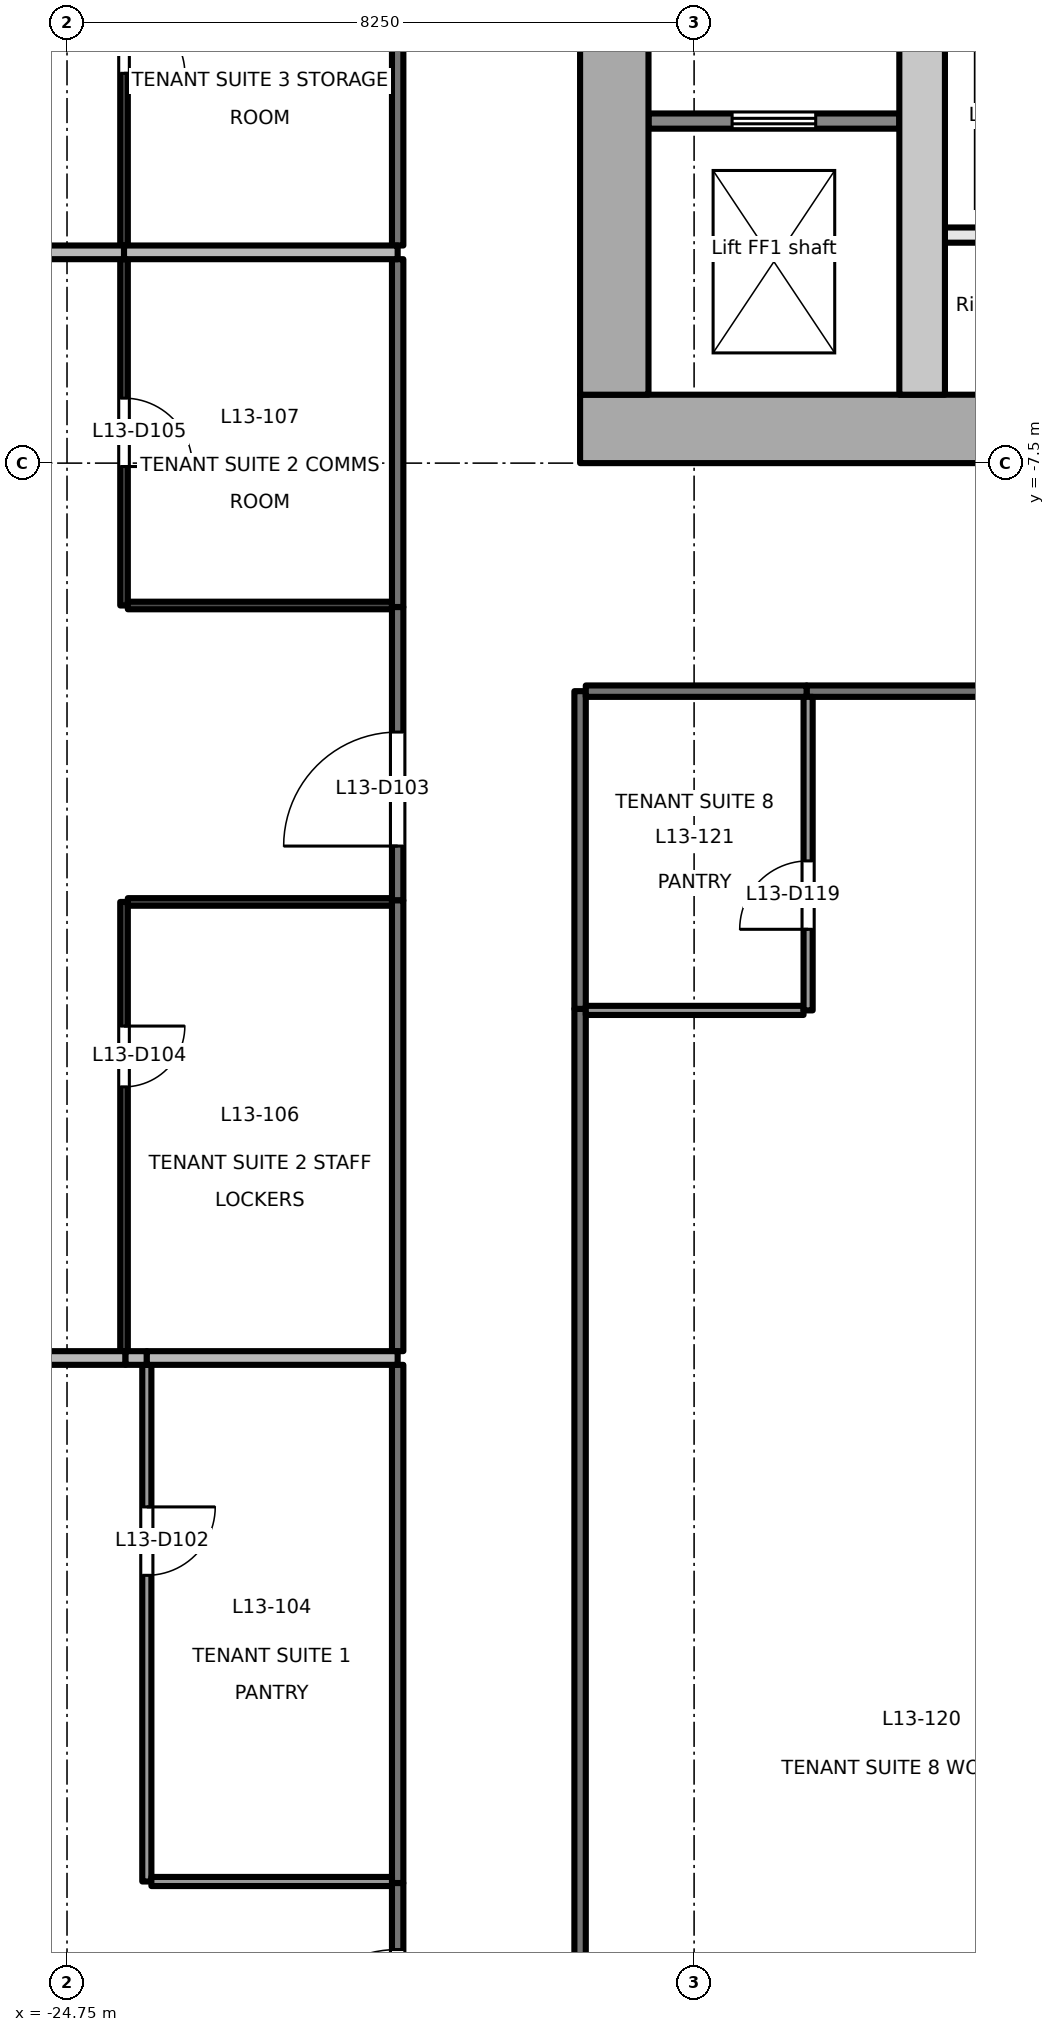
"""IFC4 building model, lengths in metres.
Left out: names, types, materials, properties, quantities, classifications, styles, units other than length and angle.
Written with IfcOpenShell. Run it as: python <this file> out.ifc"""

import sys

from ifc_helpers import new_model, si_unit, direction, frame, frame_2d, origin, place, context, subcontext, project, spatial, rectangle, extrude, element, fill, save


model = new_model("IFC4")
c1 = context("Model", 3, precision=1e-05, world=origin(), true_north=direction((0.0, 1.0)))
c2 = subcontext(c1, "Body", "Model", "MODEL_VIEW")
j1 = project(units=[si_unit("LENGTHUNIT", "METRE"), si_unit("PLANEANGLEUNIT", "RADIAN")], contexts=[c1])
p1 = place(None, origin())
s1 = spatial("IfcSite", under=j1, at=p1, CompositionType="ELEMENT")
p2 = place(p1, origin())
s2 = spatial("IfcBuilding", under=s1, at=p2, CompositionType="ELEMENT")
p3 = place(p2, frame((0.0, 0.0, 61.1)))
s3 = spatial("IfcBuildingStorey", under=s2, at=p3, CompositionType="ELEMENT", Elevation=61.1)
p4 = place(p3, frame((-18.0, -7.05, -0.2), z_axis=(0.0, 0.0, 1.0), x_axis=(1.0, 0.0, 0.0)))
e1 = element("IfcWall", 1, at=p4, inside=s3, PredefinedType="SHEAR", context=c2, shape_type="SweptSolid", body=[
    extrude(rectangle(XDim=36.0, YDim=0.9, at=frame_2d((18.0, 0.0))), origin(), (0.0, 0.0, 1.0), 4.1),
])
p5 = place(p4, frame((7.8, 0.0, 0.2)))
e2 = element("IfcOpeningElement", 2, at=p5, cuts=e1, PredefinedType="OPENING", context=c2, shape_type="SweptSolid", body=[
    extrude(rectangle(XDim=2.4, YDim=2.1, at=frame_2d((1.2, 1.05))), frame((0.0, 0.46, 0.0), z_axis=(0.0, -1.0, 0.0), x_axis=(1.0, 0.0, 0.0)), (0.0, 0.0, 1.0), 0.921),
])
p6 = place(p4, frame((17.4, 0.0, 0.2)))
e3 = element("IfcOpeningElement", 3, at=p6, cuts=e1, PredefinedType="OPENING", context=c2, shape_type="SweptSolid", body=[
    extrude(rectangle(XDim=1.2, YDim=2.1, at=frame_2d((0.6, 1.05))), frame((0.0, 0.46, 0.0), z_axis=(0.0, -1.0, 0.0), x_axis=(1.0, 0.0, 0.0)), (0.0, 0.0, 1.0), 0.921),
])
p7 = place(p4, frame((26.1, 0.0, 0.2)))
e4 = element("IfcOpeningElement", 4, at=p7, cuts=e1, PredefinedType="OPENING", context=c2, shape_type="SweptSolid", body=[
    extrude(rectangle(XDim=2.4, YDim=2.1, at=frame_2d((1.2, 1.05))), frame((0.0, 0.46, 0.0), z_axis=(0.0, -1.0, 0.0), x_axis=(1.0, 0.0, 0.0)), (0.0, 0.0, 1.0), 0.921),
])
p8 = place(p3, frame((-17.55, -6.6, -0.2), z_axis=(0.0, 0.0, 1.0), x_axis=(0.0, 1.0, 0.0)))
e5 = element("IfcWall", 5, at=p8, inside=s3, PredefinedType="SHEAR", context=c2, shape_type="SweptSolid", body=[
    extrude(rectangle(XDim=13.2, YDim=0.9, at=frame_2d((6.6, 0.0))), origin(), (0.0, 0.0, 1.0), 4.1),
])
p9 = place(p8, frame((4.55, 0.0, 0.2)))
e6 = element("IfcOpeningElement", 6, at=p9, cuts=e5, PredefinedType="OPENING", context=c2, shape_type="SweptSolid", body=[
    extrude(rectangle(XDim=1.2, YDim=2.1, at=frame_2d((0.6, 1.05))), frame((0.0, 0.46, 0.0), z_axis=(0.0, -1.0, 0.0), x_axis=(1.0, 0.0, 0.0)), (0.0, 0.0, 1.0), 0.921),
])
p10 = place(p3, frame((-13.5, -6.6, -0.2), z_axis=(0.0, 0.0, 1.0), x_axis=(0.0, 1.0, 0.0)))
e7 = element("IfcWall", 7, at=p10, inside=s3, PredefinedType="SHEAR", context=c2, shape_type="SweptSolid", body=[
    extrude(rectangle(XDim=13.2, YDim=0.6, at=frame_2d((6.6, 0.0))), origin(), (0.0, 0.0, 1.0), 4.1),
])
p11 = place(p3, frame((-17.1, -3.0, 0.0), z_axis=(0.0, 0.0, 1.0), x_axis=(1.0, 0.0, 0.0)))
e8 = element("IfcWall", 8, at=p11, inside=s3, PredefinedType="PARTITIONING", context=c2, shape_type="SweptSolid", body=[
    extrude(rectangle(XDim=3.3, YDim=0.2, at=frame_2d((1.65, 0.0))), origin(), (0.0, 0.0, 1.0), 3.9),
])
p12 = place(p11, frame((1.1, 0.0, 0.0)))
e9 = element("IfcOpeningElement", 9, at=p12, cuts=e8, PredefinedType="OPENING", context=c2, shape_type="SweptSolid", body=[
    extrude(rectangle(XDim=1.1, YDim=2.1, at=frame_2d((0.55, 1.05))), frame((0.0, 0.111, 0.0), z_axis=(0.0, -1.0, 0.0), x_axis=(1.0, 0.0, 0.0)), (0.0, 0.0, 1.0), 0.221),
])
p13 = place(p3, frame((-13.2, -4.5, 0.0), z_axis=(0.0, 0.0, 1.0), x_axis=(1.0, 0.0, 0.0)))
e10 = element("IfcWall", 10, at=p13, inside=s3, PredefinedType="PARTITIONING", context=c2, shape_type="SweptSolid", body=[
    extrude(rectangle(XDim=2.3, YDim=0.2, at=frame_2d((1.15, 0.0))), origin(), (0.0, 0.0, 1.0), 3.9),
])
p14 = place(p3, frame((-20.4, -30.68, 0.0), z_axis=(0.0, 0.0, 1.0), x_axis=(0.0, 1.0, 0.0)))
e11 = element("IfcWall", 11, at=p14, inside=s3, PredefinedType="PARTITIONING", context=c2, shape_type="SweptSolid", body=[
    extrude(rectangle(XDim=4.5, YDim=0.15, at=frame_2d((2.25, 0.0))), origin(), (0.0, 0.0, 1.0), 3.3),
])
p15 = place(p14, frame((2.125, 0.0, 0.0)))
e12 = element("IfcOpeningElement", 12, at=p15, cuts=e11, PredefinedType="OPENING", context=c2, shape_type="SweptSolid", body=[
    extrude(rectangle(XDim=1.5, YDim=2.1, at=frame_2d((0.75, 1.05))), frame((0.0, 0.085, 0.0), z_axis=(0.0, -1.0, 0.0), x_axis=(1.0, 0.0, 0.0)), (0.0, 0.0, 1.0), 0.171),
])
p16 = place(p3, frame((-20.4, -26.18, 0.0), z_axis=(0.0, 0.0, 1.0), x_axis=(0.0, 1.0, 0.0)))
e13 = element("IfcWall", 13, at=p16, inside=s3, PredefinedType="PARTITIONING", context=c2, shape_type="SweptSolid", body=[
    extrude(rectangle(XDim=6.817, YDim=0.15, at=frame_2d((3.408, 0.0))), origin(), (0.0, 0.0, 1.0), 3.3),
])
p17 = place(p3, frame((-20.4, -13.253, 0.0), z_axis=(0.0, 0.0, 1.0), x_axis=(0.0, 1.0, 0.0)))
e14 = element("IfcWall", 14, at=p17, inside=s3, PredefinedType="PARTITIONING", context=c2, shape_type="SweptSolid", body=[
    extrude(rectangle(XDim=3.86, YDim=0.15, at=frame_2d((1.93, 0.0))), origin(), (0.0, 0.0, 1.0), 3.9),
])
p18 = place(p17, frame((0.715, 0.0, 0.0)))
e15 = element("IfcOpeningElement", 15, at=p18, cuts=e14, PredefinedType="OPENING", context=c2, shape_type="SweptSolid", body=[
    extrude(rectangle(XDim=1.5, YDim=2.1, at=frame_2d((0.75, 1.05))), frame((0.0, 0.085, 0.0), z_axis=(0.0, -1.0, 0.0), x_axis=(1.0, 0.0, 0.0)), (0.0, 0.0, 1.0), 0.171),
])
p19 = place(p3, frame((-20.4, -19.183, 0.0), z_axis=(0.0, 0.0, 1.0), x_axis=(0.0, 1.0, 0.0)))
e16 = element("IfcWall", 16, at=p19, inside=s3, PredefinedType="PARTITIONING", context=c2, shape_type="SweptSolid", body=[
    extrude(rectangle(XDim=5.93, YDim=0.15, at=frame_2d((2.965, 0.0))), origin(), (0.0, 0.0, 1.0), 3.3),
])
p20 = place(p3, frame((-20.4, -9.393, 0.0), z_axis=(0.0, 0.0, 1.0), x_axis=(0.0, 1.0, 0.0)))
e17 = element("IfcWall", 17, at=p20, inside=s3, PredefinedType="PARTITIONING", context=c2, shape_type="SweptSolid", body=[
    extrude(rectangle(XDim=4.576, YDim=0.15, at=frame_2d((2.288, 0.0))), origin(), (0.0, 0.0, 1.0), 3.3),
])
p21 = place(p3, frame((-20.4, -4.637, 0.0), z_axis=(0.0, 0.0, 1.0), x_axis=(0.0, 1.0, 0.0)))
e18 = element("IfcWall", 18, at=p21, inside=s3, PredefinedType="PARTITIONING", context=c2, shape_type="SweptSolid", body=[
    extrude(rectangle(XDim=5.33, YDim=0.15, at=frame_2d((2.665, 0.0))), origin(), (0.0, 0.0, 1.0), 3.3),
])
p22 = place(p3, frame((-18.0, -14.68, 0.0), z_axis=(0.0, 0.0, 1.0), x_axis=(0.0, -1.0, 0.0)))
e19 = element("IfcWall", 19, at=p22, inside=s3, PredefinedType="PARTITIONING", context=c2, shape_type="SweptSolid", body=[
    extrude(rectangle(XDim=19.06, YDim=0.15, at=frame_2d((9.53, 0.0))), origin(), (0.0, 0.0, 1.0), 2.5),
])
p23 = place(p22, frame((13.045, 0.0, 0.0)))
e20 = element("IfcOpeningElement", 20, at=p23, cuts=e19, PredefinedType="OPENING", context=c2, shape_type="SweptSolid", body=[
    extrude(rectangle(XDim=1.5, YDim=2.1, at=frame_2d((0.75, 1.05))), frame((0.0, 0.085, 0.0), z_axis=(0.0, -1.0, 0.0), x_axis=(1.0, 0.0, 0.0)), (0.0, 0.0, 1.0), 0.171),
])
p24 = place(p3, frame((-9.09, -10.5, 0.0), z_axis=(0.0, 0.0, 1.0), x_axis=(-1.0, 0.0, 0.0)))
e21 = element("IfcWall", 21, at=p24, inside=s3, PredefinedType="PARTITIONING", context=c2, shape_type="SweptSolid", body=[
    extrude(rectangle(XDim=5.93, YDim=0.15, at=frame_2d((2.965, 0.0))), origin(), (0.0, 0.0, 1.0), 2.9),
])
p25 = place(p3, frame((-18.0, -10.5, 0.0), z_axis=(0.0, 0.0, 1.0), x_axis=(0.0, -1.0, 0.0)))
e22 = element("IfcWall", 22, at=p25, inside=s3, PredefinedType="PARTITIONING", context=c2, shape_type="SweptSolid", body=[
    extrude(rectangle(XDim=4.18, YDim=0.15, at=frame_2d((2.09, 0.0))), origin(), (0.0, 0.0, 1.0), 2.5),
])
p26 = place(p3, frame((-15.02, -10.5, 0.0), z_axis=(0.0, 0.0, 1.0), x_axis=(-1.0, 0.0, 0.0)))
e23 = element("IfcWall", 23, at=p26, inside=s3, PredefinedType="PARTITIONING", context=c2, shape_type="SweptSolid", body=[
    extrude(rectangle(XDim=2.905, YDim=0.15, at=frame_2d((1.453, 0.0))), origin(), (0.0, 0.0, 1.0), 2.5),
])
p27 = place(p3, frame((-23.7, -19.363, 0.0), z_axis=(0.0, 0.0, 1.0), x_axis=(0.0, -1.0, 0.0)))
e24 = element("IfcWall", 24, at=p27, inside=s3, PredefinedType="PARTITIONING", context=c2, shape_type="SweptSolid", body=[
    extrude(rectangle(XDim=6.797, YDim=0.12, at=frame_2d((3.398, 0.0))), origin(), (0.0, 0.0, 1.0), 3.3),
])
p28 = place(p27, frame((1.869, 0.0, 0.0)))
e25 = element("IfcOpeningElement", 25, at=p28, cuts=e24, PredefinedType="OPENING", context=c2, shape_type="SweptSolid", body=[
    extrude(rectangle(XDim=0.9, YDim=2.1, at=frame_2d((0.45, 1.05))), frame((0.0, 0.071, 0.0), z_axis=(0.0, -1.0, 0.0), x_axis=(1.0, 0.0, 0.0)), (0.0, 0.0, 1.0), 0.141),
])
p29 = place(p3, frame((-23.64, -26.16, 0.0), z_axis=(0.0, 0.0, 1.0), x_axis=(1.0, 0.0, 0.0)))
e26 = element("IfcWall", 26, at=p29, inside=s3, PredefinedType="PARTITIONING", context=c2, shape_type="SweptSolid", body=[
    extrude(rectangle(XDim=3.165, YDim=0.12, at=frame_2d((1.583, 0.0))), origin(), (0.0, 0.0, 1.0), 3.9),
])
p30 = place(p3, frame((-32.74, -19.273, 0.0), z_axis=(0.0, 0.0, 1.0), x_axis=(1.0, 0.0, 0.0)))
e27 = element("IfcWall", 27, at=p30, inside=s3, PredefinedType="PARTITIONING", context=c2, shape_type="SweptSolid", body=[
    extrude(rectangle(XDim=8.76, YDim=0.18, at=frame_2d((4.38, 0.0))), origin(), (0.0, 0.0, 1.0), 3.9),
])
p31 = place(p3, frame((-23.98, -19.273, 0.0), z_axis=(0.0, 0.0, 1.0), x_axis=(1.0, 0.0, 0.0)))
e28 = element("IfcWall", 28, at=p31, inside=s3, PredefinedType="PARTITIONING", context=c2, shape_type="SweptSolid", body=[
    extrude(rectangle(XDim=0.28, YDim=0.18, at=frame_2d((0.14, 0.0))), origin(), (0.0, 0.0, 1.0), 3.9),
])
p32 = place(p3, frame((-23.7, -19.273, 0.0), z_axis=(0.0, 0.0, 1.0), x_axis=(1.0, 0.0, 0.0)))
e29 = element("IfcWall", 29, at=p32, inside=s3, PredefinedType="PARTITIONING", context=c2, shape_type="SweptSolid", body=[
    extrude(rectangle(XDim=3.3, YDim=0.18, at=frame_2d((1.65, 0.0))), origin(), (0.0, 0.0, 1.0), 3.9),
])
p33 = place(p3, frame((-24.0, -13.273, 0.0), z_axis=(0.0, 0.0, 1.0), x_axis=(0.0, -1.0, 0.0)))
e30 = element("IfcWall", 30, at=p33, inside=s3, PredefinedType="PARTITIONING", context=c2, shape_type="SweptSolid", body=[
    extrude(rectangle(XDim=5.91, YDim=0.1, at=frame_2d((2.955, 0.0))), origin(), (0.0, 0.0, 1.0), 3.3),
])
p34 = place(p33, frame((1.633, 0.0, 0.0)))
e31 = element("IfcOpeningElement", 31, at=p34, cuts=e30, PredefinedType="OPENING", context=c2, shape_type="SweptSolid", body=[
    extrude(rectangle(XDim=0.8, YDim=2.1, at=frame_2d((0.4, 1.05))), frame((0.0, 0.061, 0.0), z_axis=(0.0, -1.0, 0.0), x_axis=(1.0, 0.0, 0.0)), (0.0, 0.0, 1.0), 0.121),
])
p35 = place(p3, frame((-20.475, -13.273, 0.0), z_axis=(0.0, 0.0, 1.0), x_axis=(-1.0, 0.0, 0.0)))
e32 = element("IfcWall", 32, at=p35, inside=s3, PredefinedType="PARTITIONING", context=c2, shape_type="SweptSolid", body=[
    extrude(rectangle(XDim=3.475, YDim=0.1, at=frame_2d((1.737, 0.0))), origin(), (0.0, 0.0, 1.0), 3.9),
])
p36 = place(p3, frame((-24.0, -4.817, 0.0), z_axis=(0.0, 0.0, 1.0), x_axis=(0.0, -1.0, 0.0)))
e33 = element("IfcWall", 33, at=p36, inside=s3, PredefinedType="PARTITIONING", context=c2, shape_type="SweptSolid", body=[
    extrude(rectangle(XDim=4.556, YDim=0.1, at=frame_2d((2.278, 0.0))), origin(), (0.0, 0.0, 1.0), 3.3),
])
p37 = place(p36, frame((1.828, 0.0, 0.0)))
e34 = element("IfcOpeningElement", 34, at=p37, cuts=e33, PredefinedType="OPENING", context=c2, shape_type="SweptSolid", body=[
    extrude(rectangle(XDim=0.9, YDim=2.1, at=frame_2d((0.45, 1.05))), frame((0.0, 0.061, 0.0), z_axis=(0.0, -1.0, 0.0), x_axis=(1.0, 0.0, 0.0)), (0.0, 0.0, 1.0), 0.121),
])
p38 = place(p3, frame((-23.95, -9.373, 0.0), z_axis=(0.0, 0.0, 1.0), x_axis=(1.0, 0.0, 0.0)))
e35 = element("IfcWall", 35, at=p38, inside=s3, PredefinedType="PARTITIONING", context=c2, shape_type="SweptSolid", body=[
    extrude(rectangle(XDim=3.475, YDim=0.1, at=frame_2d((1.737, 0.0))), origin(), (0.0, 0.0, 1.0), 3.9),
])
p39 = place(p3, frame((-32.74, -4.727, 0.0), z_axis=(0.0, 0.0, 1.0), x_axis=(1.0, 0.0, 0.0)))
e36 = element("IfcWall", 36, at=p39, inside=s3, PredefinedType="PARTITIONING", context=c2, shape_type="SweptSolid", body=[
    extrude(rectangle(XDim=8.74, YDim=0.18, at=frame_2d((4.37, 0.0))), origin(), (0.0, 0.0, 1.0), 3.3),
])
p40 = place(p3, frame((-24.0, -4.727, 0.0), z_axis=(0.0, 0.0, 1.0), x_axis=(1.0, 0.0, 0.0)))
e37 = element("IfcWall", 37, at=p40, inside=s3, PredefinedType="PARTITIONING", context=c2, shape_type="SweptSolid", body=[
    extrude(rectangle(XDim=3.6, YDim=0.18, at=frame_2d((1.8, 0.0))), origin(), (0.0, 0.0, 1.0), 3.3),
])
p41 = place(p3, frame((-24.0, 0.693, 0.0), z_axis=(0.0, 0.0, 1.0), x_axis=(0.0, -1.0, 0.0)))
e38 = element("IfcWall", 38, at=p41, inside=s3, PredefinedType="PARTITIONING", context=c2, shape_type="SweptSolid", body=[
    extrude(rectangle(XDim=5.33, YDim=0.1, at=frame_2d((2.665, 0.0))), origin(), (0.0, 0.0, 1.0), 3.3),
])
p42 = place(p41, frame((2.265, 0.0, 0.0)))
e39 = element("IfcOpeningElement", 39, at=p42, cuts=e38, PredefinedType="OPENING", context=c2, shape_type="SweptSolid", body=[
    extrude(rectangle(XDim=0.8, YDim=2.1, at=frame_2d((0.4, 1.05))), frame((0.0, 0.061, 0.0), z_axis=(0.0, -1.0, 0.0), x_axis=(1.0, 0.0, 0.0)), (0.0, 0.0, 1.0), 0.121),
])
p43 = place(p3, frame((-17.925, -14.7, 0.0), z_axis=(0.0, 0.0, 1.0), x_axis=(1.0, 0.0, 0.0)))
e40 = element("IfcWall", 40, at=p43, inside=s3, PredefinedType="PARTITIONING", context=c2, shape_type="SweptSolid", body=[
    extrude(rectangle(XDim=2.865, YDim=0.12, at=frame_2d((1.433, 0.0))), origin(), (0.0, 0.0, 1.0), 2.5),
])
p44 = place(p3, frame((-15.0, -14.7, 0.0), z_axis=(0.0, 0.0, 1.0), x_axis=(0.0, 1.0, 0.0)))
e41 = element("IfcWall", 41, at=p44, inside=s3, PredefinedType="PARTITIONING", context=c2, shape_type="SweptSolid", body=[
    extrude(rectangle(XDim=4.125, YDim=0.12, at=frame_2d((2.062, 0.0))), origin(), (0.0, 0.0, 1.0), 3.9),
])
p45 = place(p44, frame((1.067, 0.0, 0.0)))
e42 = element("IfcOpeningElement", 42, at=p45, cuts=e41, PredefinedType="OPENING", context=c2, shape_type="SweptSolid", body=[
    extrude(rectangle(XDim=0.9, YDim=2.1, at=frame_2d((0.45, 1.05))), frame((0.0, 0.071, 0.0), z_axis=(0.0, -1.0, 0.0), x_axis=(1.0, 0.0, 0.0)), (0.0, 0.0, 1.0), 0.141),
])
p46 = place(p12, origin())
e43 = element("IfcDoor", 43, at=p46, inside=s3, OperationType="DOUBLE_DOOR_SLIDING", PredefinedType="DOOR", context=c2, shape_type="SweptSolid", body=[
    extrude(rectangle(XDim=1.1, YDim=2.1, at=frame_2d((0.55, 1.05))), frame((0.0, 0.025, 0.0), z_axis=(0.0, -1.0, 0.0), x_axis=(1.0, 0.0, 0.0)), (0.0, 0.0, 1.0), 0.05),
])
fill(e9, e43)
p47 = place(p15, origin())
e44 = element("IfcDoor", 44, at=p47, inside=s3, OperationType="DOUBLE_DOOR_SINGLE_SWING", PredefinedType="DOOR", context=c2, shape_type="SweptSolid", body=[
    extrude(rectangle(XDim=1.5, YDim=2.1, at=frame_2d((0.75, 1.05))), frame((0.0, 0.025, 0.0), z_axis=(0.0, -1.0, 0.0), x_axis=(1.0, 0.0, 0.0)), (0.0, 0.0, 1.0), 0.05),
])
fill(e12, e44)
p48 = place(p28, origin())
e45 = element("IfcDoor", 45, at=p48, inside=s3, OperationType="SINGLE_SWING_LEFT", PredefinedType="DOOR", context=c2, shape_type="SweptSolid", body=[
    extrude(rectangle(XDim=0.9, YDim=2.1, at=frame_2d((0.45, 1.05))), frame((0.0, 0.025, 0.0), z_axis=(0.0, -1.0, 0.0), x_axis=(1.0, 0.0, 0.0)), (0.0, 0.0, 1.0), 0.05),
])
fill(e25, e45)
p49 = place(p18, origin())
e46 = element("IfcDoor", 46, at=p49, inside=s3, OperationType="DOUBLE_DOOR_SINGLE_SWING", PredefinedType="DOOR", context=c2, shape_type="SweptSolid", body=[
    extrude(rectangle(XDim=1.5, YDim=2.1, at=frame_2d((0.75, 1.05))), frame((0.0, 0.025, 0.0), z_axis=(0.0, -1.0, 0.0), x_axis=(1.0, 0.0, 0.0)), (0.0, 0.0, 1.0), 0.05),
])
fill(e15, e46)
p50 = place(p34, origin())
e47 = element("IfcDoor", 47, at=p50, inside=s3, OperationType="SINGLE_SWING_LEFT", PredefinedType="DOOR", context=c2, shape_type="SweptSolid", body=[
    extrude(rectangle(XDim=0.8, YDim=2.1, at=frame_2d((0.4, 1.05))), frame((0.0, 0.025, 0.0), z_axis=(0.0, -1.0, 0.0), x_axis=(1.0, 0.0, 0.0)), (0.0, 0.0, 1.0), 0.05),
])
fill(e31, e47)
p51 = place(p37, origin())
e48 = element("IfcDoor", 48, at=p51, inside=s3, OperationType="SINGLE_SWING_RIGHT", PredefinedType="DOOR", context=c2, shape_type="SweptSolid", body=[
    extrude(rectangle(XDim=0.9, YDim=2.1, at=frame_2d((0.45, 1.05))), frame((0.0, 0.025, 0.0), z_axis=(0.0, -1.0, 0.0), x_axis=(1.0, 0.0, 0.0)), (0.0, 0.0, 1.0), 0.05),
])
fill(e34, e48)
p52 = place(p42, origin())
e49 = element("IfcDoor", 49, at=p52, inside=s3, OperationType="SINGLE_SWING_RIGHT", PredefinedType="DOOR", context=c2, shape_type="SweptSolid", body=[
    extrude(rectangle(XDim=0.8, YDim=2.1, at=frame_2d((0.4, 1.05))), frame((0.0, 0.025, 0.0), z_axis=(0.0, -1.0, 0.0), x_axis=(1.0, 0.0, 0.0)), (0.0, 0.0, 1.0), 0.05),
])
fill(e39, e49)
p53 = place(p45, origin())
e50 = element("IfcDoor", 50, at=p53, inside=s3, OperationType="SINGLE_SWING_LEFT", PredefinedType="DOOR", context=c2, shape_type="SweptSolid", body=[
    extrude(rectangle(XDim=0.9, YDim=2.1, at=frame_2d((0.45, 1.05))), frame((0.0, 0.025, 0.0), z_axis=(0.0, -1.0, 0.0), x_axis=(1.0, 0.0, 0.0)), (0.0, 0.0, 1.0), 0.05),
])
fill(e42, e50)
save(model, sys.argv[1])
